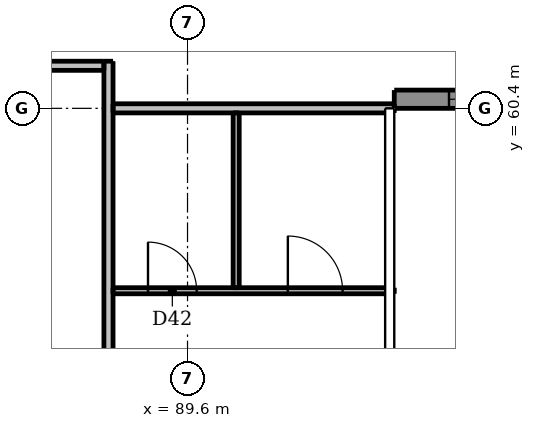
"""IFC4 building model, lengths in metres.
Left out: names, types, materials, properties, quantities, classifications, styles, units other than length and angle.
Written with IfcOpenShell. Run it as: python <this file> out.ifc"""

import sys

from ifc_helpers import new_model, si_unit, direction, frame, frame_2d, origin, place, context, subcontext, project, spatial, rectangle, extrude, element, fill, save


model = new_model("IFC4")
c1 = context("Model", 3, precision=1e-05, world=origin(), true_north=direction((0.0, 1.0)))
c2 = subcontext(c1, "Body", "Model", "MODEL_VIEW")
j1 = project(units=[si_unit("LENGTHUNIT", "METRE"), si_unit("PLANEANGLEUNIT", "RADIAN")], contexts=[c1])
p1 = place(None, origin())
s1 = spatial("IfcSite", under=j1, at=p1, CompositionType="ELEMENT")
p2 = place(p1, origin())
s2 = spatial("IfcBuilding", under=s1, at=p2, CompositionType="ELEMENT")
p3 = place(p2, frame((0.0, 0.0, 220.0)))
s3 = spatial("IfcBuildingStorey", under=s2, at=p3, CompositionType="ELEMENT", Elevation=220.0)
p4 = place(p3, frame((93.0, 60.55, 0.0), z_axis=(0.0, 0.0, 1.0), x_axis=(1.0, 0.0, 0.0)))
e1 = element("IfcWall", 1, at=p4, inside=s3, PredefinedType="SOLIDWALL", context=c2, shape_type="SweptSolid", body=[
    extrude(rectangle(XDim=3.3, YDim=0.3, at=frame_2d((1.65, 0.0))), origin(), (0.0, 0.0, 1.0), 3.05),
])
p5 = place(p4, frame((0.9, 0.0, 0.9)))
e2 = element("IfcOpeningElement", 2, at=p5, cuts=e1, PredefinedType="OPENING", context=c2, shape_type="SweptSolid", body=[
    extrude(rectangle(XDim=1.5, YDim=1.5, at=frame_2d((0.75, 0.75))), frame((0.0, 0.16, 0.0), z_axis=(0.0, -1.0, 0.0), x_axis=(1.0, 0.0, 0.0)), (0.0, 0.0, 1.0), 0.32),
])
p6 = place(p3, frame((90.4, 57.45, 0.0), z_axis=(0.0, 0.0, 1.0), x_axis=(0.0, 1.0, 0.0)))
e3 = element("IfcWall", 3, at=p6, inside=s3, PredefinedType="PARTITIONING", context=c2, shape_type="SweptSolid", body=[
    extrude(rectangle(XDim=2.875, YDim=0.1, at=frame_2d((1.438, 0.0))), origin(), (0.0, 0.0, 1.0), 3.05),
])
p7 = place(p3, frame((88.375, 57.4, 0.0), z_axis=(0.0, 0.0, 1.0), x_axis=(1.0, 0.0, 0.0)))
e4 = element("IfcWall", 4, at=p7, inside=s3, PredefinedType="PARTITIONING", context=c2, shape_type="SweptSolid", body=[
    extrude(rectangle(XDim=4.625, YDim=0.1, at=frame_2d((2.312, 0.0))), origin(), (0.0, 0.0, 1.0), 3.05),
])
p8 = place(p7, frame((2.875, 0.0, 0.0)))
e5 = element("IfcOpeningElement", 5, at=p8, cuts=e4, PredefinedType="OPENING", context=c2, shape_type="SweptSolid", body=[
    extrude(rectangle(XDim=0.9, YDim=2.1, at=frame_2d((0.45, 1.05))), frame((0.0, 0.06, 0.0), z_axis=(0.0, -1.0, 0.0), x_axis=(1.0, 0.0, 0.0)), (0.0, 0.0, 1.0), 0.12),
])
p9 = place(p7, frame((0.575, 0.0, 0.0)))
e6 = element("IfcOpeningElement", 6, at=p9, cuts=e4, PredefinedType="OPENING", context=c2, shape_type="SweptSolid", body=[
    extrude(rectangle(XDim=0.8, YDim=2.1, at=frame_2d((0.4, 1.05))), frame((0.0, 0.06, 0.0), z_axis=(0.0, -1.0, 0.0), x_axis=(1.0, 0.0, 0.0)), (0.0, 0.0, 1.0), 0.12),
])
p10 = place(p3, frame((88.3, 61.175, 0.0), z_axis=(0.0, 0.0, 1.0), x_axis=(0.0, -1.0, 0.0)))
e7 = element("IfcWall", 7, at=p10, inside=s3, PredefinedType="PARTITIONING", context=c2, shape_type="SweptSolid", body=[
    extrude(rectangle(XDim=29.4, YDim=0.15, at=frame_2d((14.7, 0.0))), origin(), (0.0, 0.0, 1.0), 3.05),
])
p11 = place(p10, frame((28.125, 0.0, 0.0)))
e8 = element("IfcOpeningElement", 8, at=p11, cuts=e7, PredefinedType="OPENING", context=c2, shape_type="SweptSolid", body=[
    extrude(rectangle(XDim=1.0, YDim=2.1, at=frame_2d((0.5, 1.05))), frame((0.0, 0.085, 0.0), z_axis=(0.0, -1.0, 0.0), x_axis=(1.0, 0.0, 0.0)), (0.0, 0.0, 1.0), 0.17),
])
p12 = place(p10, frame((15.275, 0.0, 0.0)))
e9 = element("IfcOpeningElement", 9, at=p12, cuts=e7, PredefinedType="OPENING", context=c2, shape_type="SweptSolid", body=[
    extrude(rectangle(XDim=1.0, YDim=2.1, at=frame_2d((0.5, 1.05))), frame((0.0, 0.085, 0.0), z_axis=(0.0, -1.0, 0.0), x_axis=(1.0, 0.0, 0.0)), (0.0, 0.0, 1.0), 0.17),
])
p13 = place(p10, frame((5.075, 0.0, 0.0)))
e10 = element("IfcOpeningElement", 10, at=p13, cuts=e7, PredefinedType="OPENING", context=c2, shape_type="SweptSolid", body=[
    extrude(rectangle(XDim=1.0, YDim=2.1, at=frame_2d((0.5, 1.05))), frame((0.0, 0.085, 0.0), z_axis=(0.0, -1.0, 0.0), x_axis=(1.0, 0.0, 0.0)), (0.0, 0.0, 1.0), 0.17),
])
p14 = place(p3, frame((58.975, 61.1, 0.0), z_axis=(0.0, 0.0, 1.0), x_axis=(1.0, 0.0, 0.0)))
e11 = element("IfcWall", 11, at=p14, inside=s3, PredefinedType="PARTITIONING", context=c2, shape_type="SweptSolid", body=[
    extrude(rectangle(XDim=29.25, YDim=0.15, at=frame_2d((14.625, 0.0))), origin(), (0.0, 0.0, 1.0), 3.05),
])
p15 = place(p14, frame((7.925, 0.0, 0.0)))
e12 = element("IfcOpeningElement", 12, at=p15, cuts=e11, PredefinedType="OPENING", context=c2, shape_type="SweptSolid", body=[
    extrude(rectangle(XDim=1.0, YDim=2.1, at=frame_2d((0.5, 1.05))), frame((0.0, 0.085, 0.0), z_axis=(0.0, -1.0, 0.0), x_axis=(1.0, 0.0, 0.0)), (0.0, 0.0, 1.0), 0.17),
])
p16 = place(p14, frame((26.475, 0.0, 0.0)))
e13 = element("IfcOpeningElement", 13, at=p16, cuts=e11, PredefinedType="OPENING", context=c2, shape_type="SweptSolid", body=[
    extrude(rectangle(XDim=1.0, YDim=2.1, at=frame_2d((0.5, 1.05))), frame((0.0, 0.085, 0.0), z_axis=(0.0, -1.0, 0.0), x_axis=(1.0, 0.0, 0.0)), (0.0, 0.0, 1.0), 0.17),
])
p17 = place(p3, frame((88.375, 60.4, 0.0), z_axis=(0.0, 0.0, 1.0), x_axis=(1.0, 0.0, 0.0)))
e14 = element("IfcWall", 14, at=p17, inside=s3, PredefinedType="PARTITIONING", context=c2, shape_type="SweptSolid", body=[
    extrude(rectangle(XDim=4.625, YDim=0.15, at=frame_2d((2.312, 0.0))), origin(), (0.0, 0.0, 1.0), 2.59),
])
p18 = place(p5, origin())
e15 = element("IfcWindow", 15, at=p18, inside=s3, PartitioningType="DOUBLE_PANEL_VERTICAL", PredefinedType="WINDOW", context=c2, shape_type="SweptSolid", body=[
    extrude(rectangle(XDim=1.5, YDim=1.5, at=frame_2d((0.75, 0.75))), frame((0.0, 0.03, 0.0), z_axis=(0.0, -1.0, 0.0), x_axis=(1.0, 0.0, 0.0)), (0.0, 0.0, 1.0), 0.06),
])
fill(e2, e15)
p19 = place(p8, origin())
e16 = element("IfcDoor", 16, at=p19, inside=s3, OperationType="SINGLE_SWING_LEFT", PredefinedType="DOOR", context=c2, shape_type="SweptSolid", body=[
    extrude(rectangle(XDim=0.9, YDim=2.1, at=frame_2d((0.45, 1.05))), frame((0.0, 0.025, 0.0), z_axis=(0.0, -1.0, 0.0), x_axis=(1.0, 0.0, 0.0)), (0.0, 0.0, 1.0), 0.05),
])
fill(e5, e16)
p20 = place(p9, origin())
e17 = element("IfcDoor", 17, at=p20, inside=s3, OperationType="SINGLE_SWING_LEFT", PredefinedType="DOOR", context=c2, shape_type="SweptSolid", body=[
    extrude(rectangle(XDim=0.8, YDim=2.1, at=frame_2d((0.4, 1.05))), frame((0.0, 0.025, 0.0), z_axis=(0.0, -1.0, 0.0), x_axis=(1.0, 0.0, 0.0)), (0.0, 0.0, 1.0), 0.05),
])
fill(e6, e17)
save(model, sys.argv[1])
